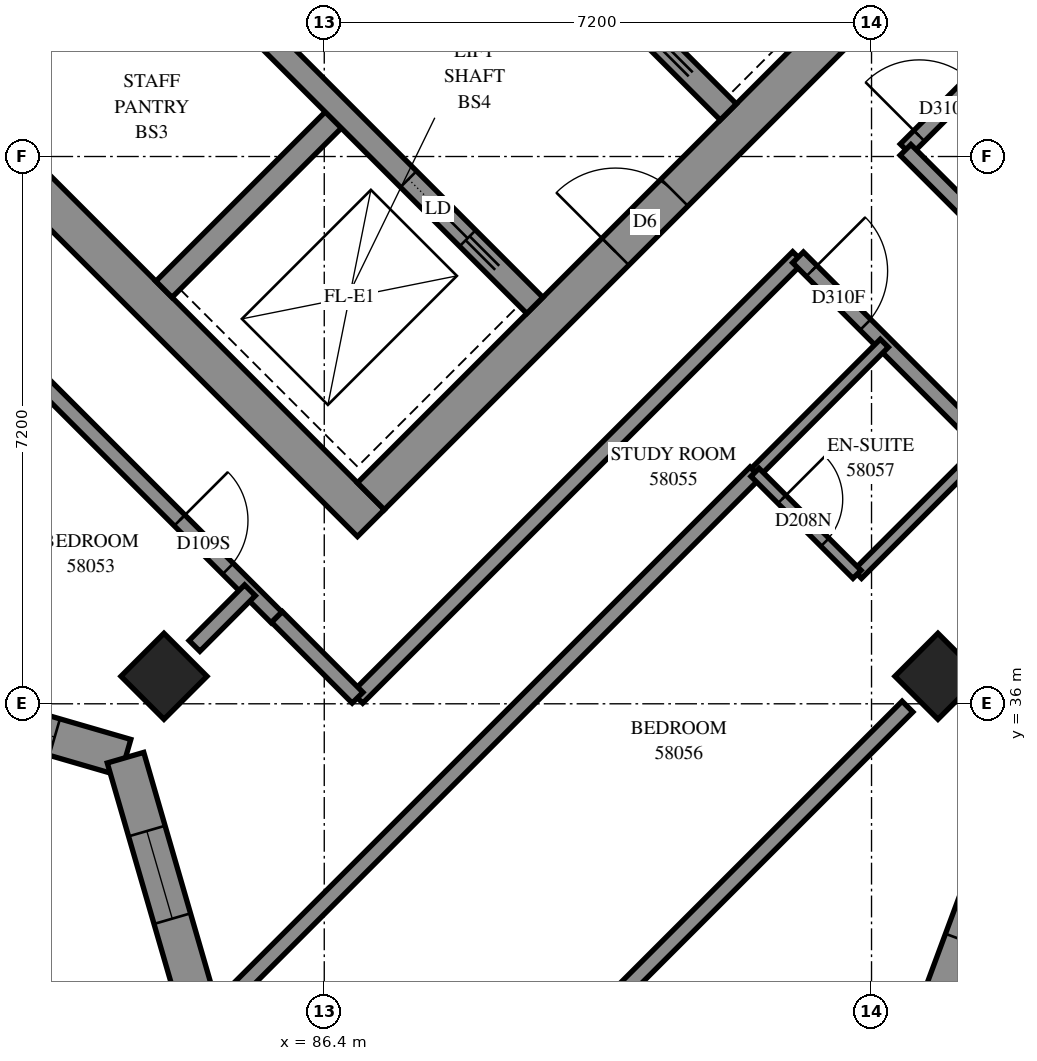
"""IFC4 building model, lengths in metres.
Left out: names, types, materials, properties, quantities, classifications, styles, units other than length and angle.
Written with IfcOpenShell. Run it as: python <this file> out.ifc"""

import sys

from ifc_helpers import new_model, si_unit, direction, frame, frame_2d, origin, origin_2d, place, context, subcontext, project, spatial, polyline, rectangle, outline, extrude, element, fill, save


model = new_model("IFC4")
c1 = context("Model", 3, precision=1e-05, world=origin(), true_north=direction((0.0, 1.0)))
c2 = subcontext(c1, "Body", "Model", "MODEL_VIEW")
j1 = project(units=[si_unit("LENGTHUNIT", "METRE"), si_unit("PLANEANGLEUNIT", "RADIAN")], contexts=[c1])
p1 = place(None, origin())
s1 = spatial("IfcSite", under=j1, at=p1, CompositionType="ELEMENT")
p2 = place(p1, origin())
s2 = spatial("IfcBuilding", under=s1, at=p2, CompositionType="ELEMENT")
p3 = place(p2, frame((0.0, 0.0, 213.4)))
s3 = spatial("IfcBuildingStorey", under=s2, at=p3, CompositionType="ELEMENT", Elevation=213.4)
for number, where, z_axis, x_axis in (
    (1, (84.291, 36.362, 0.0), (0.0, 0.0, 1.0), (0.707, -0.707, 0.0)),
    (2, (94.474, 36.362, 0.0), (0.0, 0.0, 1.0), (0.707, -0.707, 0.0)),
):
    element("IfcColumn", number, at=place(p3, frame(where, z_axis=z_axis, x_axis=x_axis)), inside=s3, PredefinedType="COLUMN", context=c2, shape_type="SweptSolid", body=[
        extrude(rectangle(XDim=0.8, YDim=0.8, at=origin_2d()), origin(), (0.0, 0.0, 1.0), 3.1),
    ])
p4 = place(p3, frame((76.124, 49.267, -0.3), z_axis=(0.0, 0.0, 1.0), x_axis=(0.7071067812, -0.7071067812, 0.0)))
e3 = element("IfcWall", 3, at=p4, inside=s3, PredefinedType="SHEAR", context=c2, shape_type="SweptSolid", body=[
    extrude(rectangle(XDim=15.4, YDim=0.5, at=frame_2d((7.7, 0.0))), origin(), (0.0, 0.0, 1.0), 2.7),
])
p5 = place(p3, frame((87.013, 38.731, -0.3), z_axis=(0.0, 0.0, 1.0), x_axis=(0.7071067812, 0.7071067812, 0.0)))
e4 = element("IfcWall", 4, at=p5, inside=s3, PredefinedType="SHEAR", context=c2, shape_type="SweptSolid", body=[
    extrude(rectangle(XDim=14.4, YDim=0.5, at=frame_2d((7.2, 0.0))), origin(), (0.0, 0.0, 1.0), 2.7),
])
p6 = place(p5, frame((4.55, 0.0, 0.3)))
e5 = element("IfcOpeningElement", 5, at=p6, cuts=e4, PredefinedType="OPENING", context=c2, shape_type="SweptSolid", body=[
    extrude(rectangle(XDim=1.1, YDim=2.1, at=frame_2d((0.55, 1.05))), frame((0.0, 0.26, 0.0), z_axis=(0.0, -1.0, 0.0), x_axis=(1.0, 0.0, 0.0)), (0.0, 0.0, 1.0), 0.52),
])
p7 = place(p5, frame((11.35, 0.0, 0.3)))
e6 = element("IfcOpeningElement", 6, at=p7, cuts=e4, PredefinedType="OPENING", context=c2, shape_type="SweptSolid", body=[
    extrude(rectangle(XDim=1.1, YDim=2.1, at=frame_2d((0.55, 1.05))), frame((0.0, 0.26, 0.0), z_axis=(0.0, -1.0, 0.0), x_axis=(1.0, 0.0, 0.0)), (0.0, 0.0, 1.0), 0.52),
])
for number, where, z_axis, x_axis in (
    (7, (81.746, 43.999, 0.0), (0.0, 0.0, 1.0), (0.707, 0.707, 0.0)),
    (8, (84.291, 41.453, 0.0), (0.0, 0.0, 1.0), (0.707, 0.707, 0.0)),
):
    element("IfcWall", number, at=place(p3, frame(where, z_axis=z_axis, x_axis=x_axis)), inside=s3, PredefinedType="SOLIDWALL", context=c2, shape_type="SweptSolid", body=[
        extrude(rectangle(XDim=3.3, YDim=0.3, at=frame_2d((1.65, 0.0))), origin(), (0.0, 0.0, 1.0), 3.1),
    ])
p8 = place(p3, frame((78.988, 51.423, 0.0), z_axis=(0.0, 0.0, 1.0), x_axis=(0.7071067812, -0.7071067812, 0.0)))
e9 = element("IfcWall", 9, at=p8, inside=s3, PredefinedType="SOLIDWALL", context=c2, shape_type="SweptSolid", body=[
    extrude(rectangle(XDim=14.4, YDim=0.3, at=frame_2d((7.2, 0.0))), origin(), (0.0, 0.0, 1.0), 3.1),
])
p9 = place(p8, frame((1.35, 0.0, 0.0)))
e10 = element("IfcOpeningElement", 10, at=p9, cuts=e9, PredefinedType="OPENING", context=c2, shape_type="SweptSolid", body=[
    extrude(rectangle(XDim=0.9, YDim=2.1, at=frame_2d((0.45, 1.05))), frame((0.0, 0.16, 0.0), z_axis=(0.0, -1.0, 0.0), x_axis=(1.0, 0.0, 0.0)), (0.0, 0.0, 1.0), 0.32),
])
p10 = place(p8, frame((4.95, 0.0, 0.0)))
e11 = element("IfcOpeningElement", 11, at=p10, cuts=e9, PredefinedType="OPENING", context=c2, shape_type="SweptSolid", body=[
    extrude(rectangle(XDim=0.9, YDim=2.1, at=frame_2d((0.45, 1.05))), frame((0.0, 0.16, 0.0), z_axis=(0.0, -1.0, 0.0), x_axis=(1.0, 0.0, 0.0)), (0.0, 0.0, 1.0), 0.32),
])
p11 = place(p8, frame((8.55, 0.0, 0.0)))
e12 = element("IfcOpeningElement", 12, at=p11, cuts=e9, PredefinedType="OPENING", context=c2, shape_type="SweptSolid", body=[
    extrude(rectangle(XDim=0.9, YDim=2.1, at=frame_2d((0.45, 1.05))), frame((0.0, 0.16, 0.0), z_axis=(0.0, -1.0, 0.0), x_axis=(1.0, 0.0, 0.0)), (0.0, 0.0, 1.0), 0.32),
])
p12 = place(p8, frame((12.05, 0.0, 0.0)))
e13 = element("IfcOpeningElement", 13, at=p12, cuts=e9, PredefinedType="OPENING", context=c2, shape_type="SweptSolid", body=[
    extrude(rectangle(XDim=1.1, YDim=2.1, at=frame_2d((0.55, 1.05))), frame((0.0, 0.16, 0.0), z_axis=(0.0, -1.0, 0.0), x_axis=(1.0, 0.0, 0.0)), (0.0, 0.0, 1.0), 0.32),
])
p13 = place(p3, frame((81.534, 53.969, 0.0), z_axis=(0.0, 0.0, 1.0), x_axis=(0.707103309, -0.7071102534, 0.0)))
e14 = element("IfcWall", 14, at=p13, inside=s3, PredefinedType="SOLIDWALL", context=c2, shape_type="SweptSolid", body=[
    extrude(rectangle(XDim=14.4, YDim=0.3, at=frame_2d((7.2, 0.0))), origin(), (0.0, 0.0, 1.0), 3.1),
])
p14 = place(p13, frame((1.25, 0.0, 0.0)))
e15 = element("IfcOpeningElement", 15, at=p14, cuts=e14, PredefinedType="OPENING", context=c2, shape_type="SweptSolid", body=[
    extrude(rectangle(XDim=1.1, YDim=2.1, at=frame_2d((0.55, 1.05))), frame((0.0, 0.16, 0.0), z_axis=(0.0, -1.0, 0.0), x_axis=(1.0, 0.0, 0.0)), (0.0, 0.0, 1.0), 0.32),
])
p15 = place(p13, frame((4.85, 0.0, 0.0)))
e16 = element("IfcOpeningElement", 16, at=p15, cuts=e14, PredefinedType="OPENING", context=c2, shape_type="SweptSolid", body=[
    extrude(rectangle(XDim=1.1, YDim=2.1, at=frame_2d((0.55, 1.05))), frame((0.0, 0.16, 0.0), z_axis=(0.0, -1.0, 0.0), x_axis=(1.0, 0.0, 0.0)), (0.0, 0.0, 1.0), 0.32),
])
p16 = place(p13, frame((8.45, 0.0, 0.0)))
e17 = element("IfcOpeningElement", 17, at=p16, cuts=e14, PredefinedType="OPENING", context=c2, shape_type="SweptSolid", body=[
    extrude(rectangle(XDim=1.1, YDim=2.1, at=frame_2d((0.55, 1.05))), frame((0.0, 0.16, 0.0), z_axis=(0.0, -1.0, 0.0), x_axis=(1.0, 0.0, 0.0)), (0.0, 0.0, 1.0), 0.32),
])
p17 = place(p13, frame((12.05, 0.0, 0.0)))
e18 = element("IfcOpeningElement", 18, at=p17, cuts=e14, PredefinedType="OPENING", context=c2, shape_type="SweptSolid", body=[
    extrude(rectangle(XDim=1.1, YDim=2.1, at=frame_2d((0.55, 1.05))), frame((0.0, 0.16, 0.0), z_axis=(0.0, -1.0, 0.0), x_axis=(1.0, 0.0, 0.0)), (0.0, 0.0, 1.0), 0.32),
])
p18 = place(p3, frame((94.281, 31.47, 0.0), z_axis=(0.0, 0.0, 1.0), x_axis=(0.3481903374, 0.9374238577, 0.0)))
e19 = element("IfcWall", 19, at=p18, inside=s3, PredefinedType="SOLIDWALL", context=c2, shape_type="SweptSolid", body=[
    extrude(outline(polyline([(-0.12, -0.25), (5.16, -0.25), (5.39, 0.25), (0.12, 0.25), (-0.12, -0.25)])), origin(), (0.0, 0.0, 1.0), 3.1),
])
p19 = place(p18, frame((1.512, 0.0, 0.45)))
e20 = element("IfcOpeningElement", 20, at=p19, cuts=e19, PredefinedType="OPENING", context=c2, shape_type="SweptSolid", body=[
    extrude(rectangle(XDim=1.3, YDim=2.5, at=frame_2d((0.65, 1.25))), frame((0.0, 0.26, 0.0), z_axis=(0.0, -1.0, 0.0), x_axis=(1.0, 0.0, 0.0)), (0.0, 0.0, 1.0), 0.52),
])
p20 = place(p18, frame((3.012, 0.0, 0.45)))
e21 = element("IfcOpeningElement", 21, at=p20, cuts=e19, PredefinedType="OPENING", context=c2, shape_type="SweptSolid", body=[
    extrude(rectangle(XDim=1.3, YDim=2.5, at=frame_2d((0.65, 1.25))), frame((0.0, 0.26, 0.0), z_axis=(0.0, -1.0, 0.0), x_axis=(1.0, 0.0, 0.0)), (0.0, 0.0, 1.0), 0.52),
])
p21 = place(p3, frame((79.407, 36.562, 0.0), z_axis=(0.0, 0.0, 1.0), x_axis=(0.9603356169, -0.2788467373, 0.0)))
e22 = element("IfcWall", 22, at=p21, inside=s3, PredefinedType="SOLIDWALL", context=c2, shape_type="SweptSolid", body=[
    extrude(outline(polyline([(-0.144, -0.25), (4.422, -0.25), (4.697, 0.25), (0.144, 0.25), (-0.144, -0.25)])), origin(), (0.0, 0.0, 1.0), 3.1),
])
p22 = place(p21, frame((0.538, 0.0, 0.45)))
e23 = element("IfcOpeningElement", 23, at=p22, cuts=e22, PredefinedType="OPENING", context=c2, shape_type="SweptSolid", body=[
    extrude(rectangle(XDim=1.3, YDim=2.5, at=frame_2d((0.65, 1.25))), frame((0.0, 0.26, 0.0), z_axis=(0.0, -1.0, 0.0), x_axis=(1.0, 0.0, 0.0)), (0.0, 0.0, 1.0), 0.52),
])
p23 = place(p21, frame((2.288, 0.0, 0.45)))
e24 = element("IfcOpeningElement", 24, at=p23, cuts=e22, PredefinedType="OPENING", context=c2, shape_type="SweptSolid", body=[
    extrude(rectangle(XDim=1.3, YDim=2.5, at=frame_2d((0.65, 1.25))), frame((0.0, 0.26, 0.0), z_axis=(0.0, -1.0, 0.0), x_axis=(1.0, 0.0, 0.0)), (0.0, 0.0, 1.0), 0.52),
])
p24 = place(p3, frame((83.785, 35.291, 0.0), z_axis=(0.0, 0.0, 1.0), x_axis=(0.2788467373, -0.9603356169, 0.0)))
e25 = element("IfcWall", 25, at=p24, inside=s3, PredefinedType="SOLIDWALL", context=c2, shape_type="SweptSolid", body=[
    extrude(outline(polyline([(0.138, -0.25), (4.703, -0.25), (4.415, 0.25), (-0.138, 0.25), (0.138, -0.25)])), origin(), (0.0, 0.0, 1.0), 3.1),
])
p25 = place(p24, frame((1.005, 0.0, 0.45)))
e26 = element("IfcOpeningElement", 26, at=p25, cuts=e25, PredefinedType="OPENING", context=c2, shape_type="SweptSolid", body=[
    extrude(rectangle(XDim=1.2, YDim=2.5, at=frame_2d((0.6, 1.25))), frame((0.0, 0.26, 0.0), z_axis=(0.0, -1.0, 0.0), x_axis=(1.0, 0.0, 0.0)), (0.0, 0.0, 1.0), 0.52),
])
p26 = place(p3, frame((85.007, 31.981, 0.0), z_axis=(0.0, 0.0, 1.0), x_axis=(0.7072318784, 0.7069816619, 0.0)))
e27 = element("IfcWall", 27, at=p26, inside=s3, PredefinedType="PARTITIONING", context=c2, shape_type="SweptSolid", body=[
    extrude(rectangle(XDim=9.991, YDim=0.2, at=frame_2d((4.996, 0.0))), origin(), (0.0, 0.0, 1.0), 3.1),
])
p27 = place(p3, frame((94.049, 43.293, 0.0), z_axis=(0.0, 0.0, 1.0), x_axis=(0.7071067812, 0.7071067812, 0.0)))
e28 = element("IfcWall", 28, at=p27, inside=s3, PredefinedType="PARTITIONING", context=c2, shape_type="SweptSolid", body=[
    extrude(rectangle(XDim=8.2, YDim=0.2, at=frame_2d((4.1, 0.0))), origin(), (0.0, 0.0, 1.0), 3.1),
])
p28 = place(p27, frame((0.252, 0.0, 0.0)))
e29 = element("IfcOpeningElement", 29, at=p28, cuts=e28, PredefinedType="OPENING", context=c2, shape_type="SweptSolid", body=[
    extrude(rectangle(XDim=1.0, YDim=2.1, at=frame_2d((0.5, 1.05))), frame((0.0, 0.11, 0.0), z_axis=(0.0, -1.0, 0.0), x_axis=(1.0, 0.0, 0.0)), (0.0, 0.0, 1.0), 0.22),
])
p29 = place(p3, frame((86.835, 36.079, 0.0), z_axis=(0.0, 0.0, 1.0), x_axis=(0.7071067812, 0.7071067812, 0.0)))
e30 = element("IfcWall", 30, at=p29, inside=s3, PredefinedType="PARTITIONING", context=c2, shape_type="SweptSolid", body=[
    extrude(rectangle(XDim=8.2, YDim=0.2, at=frame_2d((4.1, 0.0))), origin(), (0.0, 0.0, 1.0), 3.1),
])
p30 = place(p3, frame((80.849, 42.061, 0.0), z_axis=(0.0, 0.0, 1.0), x_axis=(0.7071067812, -0.7071067812, 0.0)))
e31 = element("IfcWall", 31, at=p30, inside=s3, PredefinedType="PARTITIONING", context=c2, shape_type="SweptSolid", body=[
    extrude(rectangle(XDim=6.964, YDim=0.2, at=frame_2d((3.482, 0.0))), origin(), (0.0, 0.0, 1.0), 3.1),
])
p31 = place(p30, frame((5.159, 0.0, 0.0)))
e32 = element("IfcOpeningElement", 32, at=p31, cuts=e31, PredefinedType="OPENING", context=c2, shape_type="SweptSolid", body=[
    extrude(rectangle(XDim=0.9, YDim=2.1, at=frame_2d((0.45, 1.05))), frame((0.0, 0.11, 0.0), z_axis=(0.0, -1.0, 0.0), x_axis=(1.0, 0.0, 0.0)), (0.0, 0.0, 1.0), 0.22),
])
p32 = place(p3, frame((89.781, 31.671, 0.0), z_axis=(0.0, 0.0, 1.0), x_axis=(0.7071067812, 0.7071067812, 0.0)))
e33 = element("IfcWall", 33, at=p32, inside=s3, PredefinedType="PARTITIONING", context=c2, shape_type="SweptSolid", body=[
    extrude(rectangle(XDim=6.07, YDim=0.2, at=frame_2d((3.035, 0.0))), origin(), (0.0, 0.0, 1.0), 2.6),
])
p33 = place(p3, frame((94.047, 43.287, 0.0), z_axis=(0.0, 0.0, 1.0), x_axis=(0.7071067812, -0.7071067812, 0.0)))
e34 = element("IfcWall", 34, at=p33, inside=s3, PredefinedType="PARTITIONING", context=c2, shape_type="SweptSolid", body=[
    extrude(rectangle(XDim=5.199, YDim=0.2, at=frame_2d((2.599, 0.0))), origin(), (0.0, 0.0, 1.0), 3.1),
])
p34 = place(p33, frame((3.898, 0.0, 0.0)))
e35 = element("IfcOpeningElement", 35, at=p34, cuts=e34, PredefinedType="OPENING", context=c2, shape_type="SweptSolid", body=[
    extrude(rectangle(XDim=0.9, YDim=2.1, at=frame_2d((0.45, 1.05))), frame((0.0, 0.11, 0.0), z_axis=(0.0, -1.0, 0.0), x_axis=(1.0, 0.0, 0.0)), (0.0, 0.0, 1.0), 0.22),
])
p35 = place(p3, frame((92.633, 41.873, 0.0), z_axis=(0.0, 0.0, 1.0), x_axis=(0.7071067812, -0.7071067812, 0.0)))
e36 = element("IfcWall", 36, at=p35, inside=s3, PredefinedType="PARTITIONING", context=c2, shape_type="SweptSolid", body=[
    extrude(rectangle(XDim=5.199, YDim=0.2, at=frame_2d((2.599, 0.0))), origin(), (0.0, 0.0, 1.0), 3.1),
])
p36 = place(p35, frame((0.253, 0.0, 0.0)))
e37 = element("IfcOpeningElement", 37, at=p36, cuts=e36, PredefinedType="OPENING", context=c2, shape_type="SweptSolid", body=[
    extrude(rectangle(XDim=1.0, YDim=2.1, at=frame_2d((0.5, 1.05))), frame((0.0, 0.11, 0.0), z_axis=(0.0, -1.0, 0.0), x_axis=(1.0, 0.0, 0.0)), (0.0, 0.0, 1.0), 0.22),
])
p37 = place(p35, frame((3.948, 0.0, 0.0)))
e38 = element("IfcOpeningElement", 38, at=p37, cuts=e36, PredefinedType="OPENING", context=c2, shape_type="SweptSolid", body=[
    extrude(rectangle(XDim=0.9, YDim=2.1, at=frame_2d((0.45, 1.05))), frame((0.0, 0.11, 0.0), z_axis=(0.0, -1.0, 0.0), x_axis=(1.0, 0.0, 0.0)), (0.0, 0.0, 1.0), 0.22),
])
for number, where, z_axis, x_axis in (
    (39, (92.072, 39.046, 0.0), (0.0, 0.0, 1.0), (0.707, 0.708, 0.0)),
    (40, (93.415, 37.703, 0.0), (0.0, 0.0, 1.0), (0.708, 0.707, 0.0)),
):
    element("IfcWall", number, at=place(p3, frame(where, z_axis=z_axis, x_axis=x_axis)), inside=s3, PredefinedType="PARTITIONING", context=c2, shape_type="SweptSolid", body=[
        extrude(rectangle(XDim=2.4, YDim=0.15, at=frame_2d((1.2, 0.0))), origin(), (0.0, 0.0, 1.0), 3.1),
    ])
p38 = place(p3, frame((92.067, 39.045, 0.0), z_axis=(0.0, 0.0, 1.0), x_axis=(0.7071067812, -0.7071067812, 0.0)))
e41 = element("IfcWall", 41, at=p38, inside=s3, PredefinedType="PARTITIONING", context=c2, shape_type="SweptSolid", body=[
    extrude(rectangle(XDim=1.898, YDim=0.15, at=frame_2d((0.949, 0.0))), origin(), (0.0, 0.0, 1.0), 3.1),
])
p39 = place(p38, frame((0.501, 0.0, 0.0)))
e42 = element("IfcOpeningElement", 42, at=p39, cuts=e41, PredefinedType="OPENING", context=c2, shape_type="SweptSolid", body=[
    extrude(rectangle(XDim=0.8, YDim=2.1, at=frame_2d((0.4, 1.05))), frame((0.0, 0.085, 0.0), z_axis=(0.0, -1.0, 0.0), x_axis=(1.0, 0.0, 0.0)), (0.0, 0.0, 1.0), 0.17),
])
p40 = place(p3, frame((85.778, 37.142, 0.0), z_axis=(0.0, 0.0, 1.0), x_axis=(0.7064400143, -0.70777292, 0.0)))
e43 = element("IfcWall", 43, at=p40, inside=s3, PredefinedType="PARTITIONING", context=c2, shape_type="SweptSolid", body=[
    extrude(rectangle(XDim=1.5, YDim=0.2, at=frame_2d((0.75, 0.0))), origin(), (0.0, 0.0, 1.0), 3.1),
])
p41 = place(p3, frame((84.693, 36.761, 0.0), z_axis=(0.0, 0.0, 1.0), x_axis=(0.7061388061, 0.708073433, 0.0)))
e44 = element("IfcWall", 44, at=p41, inside=s3, PredefinedType="PARTITIONING", context=c2, shape_type="SweptSolid", body=[
    extrude(rectangle(XDim=1.034, YDim=0.2, at=frame_2d((0.517, 0.0))), origin(), (0.0, 0.0, 1.0), 3.1),
])
p42 = place(p19, origin())
e45 = element("IfcWindow", 45, at=p42, inside=s3, PartitioningType="SINGLE_PANEL", PredefinedType="WINDOW", context=c2, shape_type="SweptSolid", body=[
    extrude(rectangle(XDim=1.3, YDim=2.5, at=frame_2d((0.65, 1.25))), frame((0.0, 0.18, 0.0), z_axis=(0.0, -1.0, 0.0), x_axis=(1.0, 0.0, 0.0)), (0.0, 0.0, 1.0), 0.06),
])
fill(e20, e45)
p43 = place(p23, origin())
e46 = element("IfcWindow", 46, at=p43, inside=s3, PartitioningType="SINGLE_PANEL", PredefinedType="WINDOW", context=c2, shape_type="SweptSolid", body=[
    extrude(rectangle(XDim=1.3, YDim=2.5, at=frame_2d((0.65, 1.25))), frame((0.0, 0.18, 0.0), z_axis=(0.0, -1.0, 0.0), x_axis=(1.0, 0.0, 0.0)), (0.0, 0.0, 1.0), 0.06),
])
fill(e24, e46)
p44 = place(p25, origin())
e47 = element("IfcWindow", 47, at=p44, inside=s3, PartitioningType="SINGLE_PANEL", PredefinedType="WINDOW", context=c2, shape_type="SweptSolid", body=[
    extrude(rectangle(XDim=1.2, YDim=2.5, at=frame_2d((0.6, 1.25))), frame((0.0, 0.18, 0.0), z_axis=(0.0, -1.0, 0.0), x_axis=(1.0, 0.0, 0.0)), (0.0, 0.0, 1.0), 0.06),
])
fill(e26, e47)
p45 = place(p6, origin())
e48 = element("IfcDoor", 48, at=p45, inside=s3, OperationType="DOUBLE_DOOR_SINGLE_SWING", PredefinedType="DOOR", context=c2, shape_type="SweptSolid", body=[
    extrude(rectangle(XDim=1.1, YDim=2.1, at=frame_2d((0.55, 1.05))), frame((0.0, 0.025, 0.0), z_axis=(0.0, -1.0, 0.0), x_axis=(1.0, 0.0, 0.0)), (0.0, 0.0, 1.0), 0.05),
])
fill(e5, e48)
p46 = place(p12, origin())
e49 = element("IfcDoor", 49, at=p46, inside=s3, OperationType="SLIDING_TO_RIGHT", PredefinedType="DOOR", context=c2, shape_type="SweptSolid", body=[
    extrude(rectangle(XDim=1.1, YDim=2.1, at=frame_2d((0.55, 1.05))), frame((0.0, 0.025, 0.0), z_axis=(0.0, -1.0, 0.0), x_axis=(1.0, 0.0, 0.0)), (0.0, 0.0, 1.0), 0.05),
])
fill(e13, e49)
p47 = place(p28, origin())
e50 = element("IfcDoor", 50, at=p47, inside=s3, OperationType="SINGLE_SWING_RIGHT", PredefinedType="DOOR", context=c2, shape_type="SweptSolid", body=[
    extrude(rectangle(XDim=1.0, YDim=2.1, at=frame_2d((0.5, 1.05))), frame((0.0, 0.025, 0.0), z_axis=(0.0, -1.0, 0.0), x_axis=(1.0, 0.0, 0.0)), (0.0, 0.0, 1.0), 0.05),
])
fill(e29, e50)
p48 = place(p31, origin())
e51 = element("IfcDoor", 51, at=p48, inside=s3, OperationType="SINGLE_SWING_RIGHT", PredefinedType="DOOR", context=c2, shape_type="SweptSolid", body=[
    extrude(rectangle(XDim=0.9, YDim=2.1, at=frame_2d((0.45, 1.05))), frame((0.0, 0.025, 0.0), z_axis=(0.0, -1.0, 0.0), x_axis=(1.0, 0.0, 0.0)), (0.0, 0.0, 1.0), 0.05),
])
fill(e32, e51)
p49 = place(p36, origin())
e52 = element("IfcDoor", 52, at=p49, inside=s3, OperationType="SINGLE_SWING_RIGHT", PredefinedType="DOOR", context=c2, shape_type="SweptSolid", body=[
    extrude(rectangle(XDim=1.0, YDim=2.1, at=frame_2d((0.5, 1.05))), frame((0.0, 0.025, 0.0), z_axis=(0.0, -1.0, 0.0), x_axis=(1.0, 0.0, 0.0)), (0.0, 0.0, 1.0), 0.05),
])
fill(e37, e52)
p50 = place(p39, origin())
e53 = element("IfcDoor", 53, at=p50, inside=s3, OperationType="SINGLE_SWING_RIGHT", PredefinedType="DOOR", context=c2, shape_type="SweptSolid", body=[
    extrude(rectangle(XDim=0.8, YDim=2.1, at=frame_2d((0.4, 1.05))), frame((0.0, 0.025, 0.0), z_axis=(0.0, -1.0, 0.0), x_axis=(1.0, 0.0, 0.0)), (0.0, 0.0, 1.0), 0.05),
])
fill(e42, e53)
save(model, sys.argv[1])
